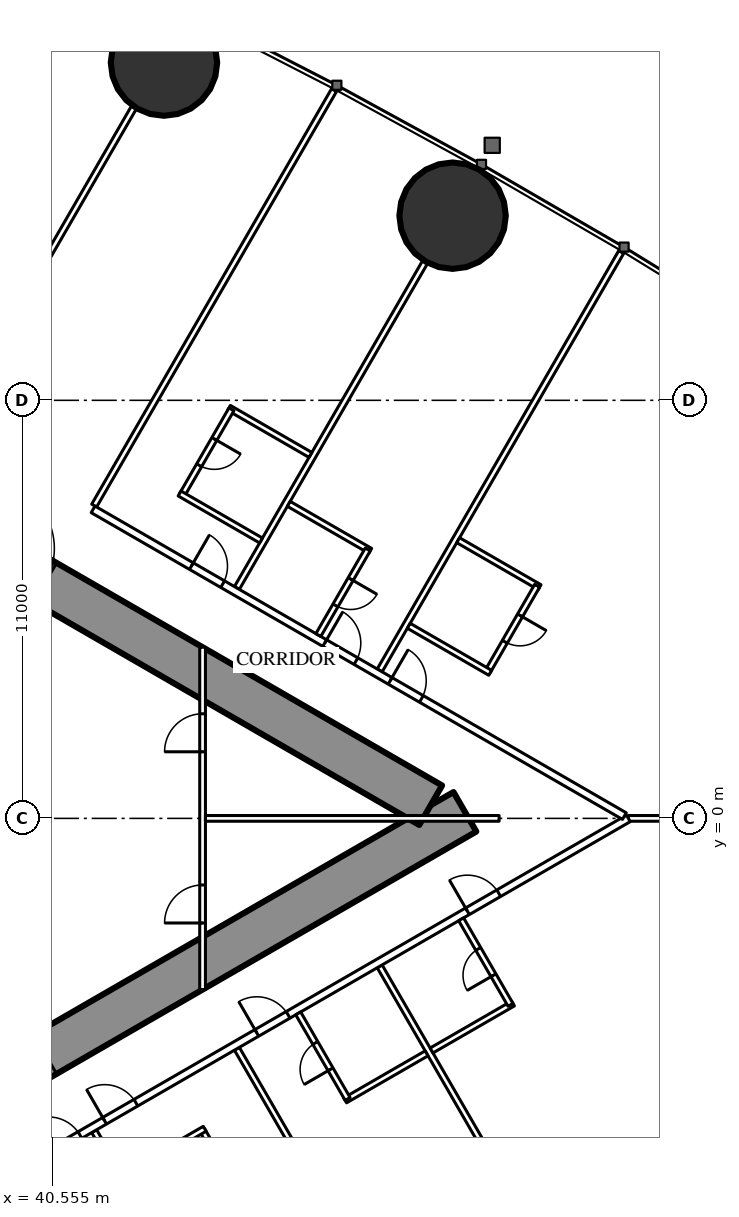
"""IFC4 building model, lengths in metres.
Left out: names, types, materials, properties, quantities, classifications, styles, units other than length and angle.
Written with IfcOpenShell. Run it as: python <this file> out.ifc"""

import sys

from ifc_helpers import new_model, si_unit, direction, frame, frame_2d, origin, origin_2d, place, context, subcontext, project, spatial, rectangle, hollow_circle, extrude, element, fill, save


model = new_model("IFC4")
c1 = context("Model", 3, precision=1e-05, world=origin(), true_north=direction((0.0, 1.0)))
c2 = subcontext(c1, "Body", "Model", "MODEL_VIEW")
j1 = project(units=[si_unit("LENGTHUNIT", "METRE"), si_unit("PLANEANGLEUNIT", "RADIAN")], contexts=[c1])
p1 = place(None, origin())
s1 = spatial("IfcSite", under=j1, at=p1, CompositionType="ELEMENT")
p2 = place(p1, origin())
s2 = spatial("IfcBuilding", under=s1, at=p2, CompositionType="ELEMENT")
p3 = place(p2, frame((0.0, 0.0, 28.5)))
s3 = spatial("IfcBuildingStorey", under=s2, at=p3, CompositionType="ELEMENT", Elevation=28.5)
for number, where, z_axis, x_axis in (
    (1, (51.078, 15.858, 0.0), (0.0, 0.0, 1.0), (1.0, 0.0, 0.0)),
    (2, (43.484, 19.886, 0.0), (0.0, 0.0, 1.0), (1.0, 0.0, 0.0)),
):
    element("IfcColumn", number, at=place(p3, frame(where, z_axis=z_axis, x_axis=x_axis)), inside=s3, PredefinedType="COLUMN", context=c2, shape_type="SweptSolid", body=[
        extrude(hollow_circle(Radius=1.4, WallThickness=0.12, at=origin_2d()), origin(), (0.0, 0.0, 1.0), 3.5),
    ])
p4 = place(p3, frame((27.2, -13.8, 0.0), z_axis=(0.0, 0.0, 1.0), x_axis=(0.866027159892, 0.499996958321, 0.0)))
e3 = element("IfcWall", 3, at=p4, inside=s3, PredefinedType="SHEAR", context=c2, shape_type="SweptSolid", body=[
    extrude(rectangle(XDim=27.947, YDim=1.2, at=frame_2d((13.973, 0.0))), origin(), (0.0, 0.0, 1.0), 3.5),
])
p5 = place(p4, frame((4.6, 0.0, 0.0)))
e4 = element("IfcOpeningElement", 4, at=p5, cuts=e3, PredefinedType="OPENING", context=c2, shape_type="SweptSolid", body=[
    extrude(rectangle(XDim=1.0, YDim=2.2, at=frame_2d((0.5, 1.1))), frame((0.0, 0.61, 0.0), z_axis=(0.0, -1.0, 0.0), x_axis=(1.0, 0.0, 0.0)), (0.0, 0.0, 1.0), 1.22),
])
p6 = place(p4, frame((13.395, 0.0, 0.0)))
e5 = element("IfcOpeningElement", 5, at=p6, cuts=e3, PredefinedType="OPENING", context=c2, shape_type="SweptSolid", body=[
    extrude(rectangle(XDim=1.8, YDim=2.2, at=frame_2d((0.9, 1.1))), frame((0.0, 0.61, 0.0), z_axis=(0.0, -1.0, 0.0), x_axis=(1.0, 0.0, 0.0)), (0.0, 0.0, 1.0), 1.22),
])
p7 = place(p3, frame((27.2, 13.8, 0.0), z_axis=(0.0, 0.0, 1.0), x_axis=(0.866024515034, -0.500001539357, 0.0)))
e6 = element("IfcWall", 6, at=p7, inside=s3, PredefinedType="SHEAR", context=c2, shape_type="SweptSolid", body=[
    extrude(rectangle(XDim=26.907, YDim=1.2, at=frame_2d((13.454, 0.0))), origin(), (0.0, 0.0, 1.0), 3.5),
])
p8 = place(p7, frame((4.6, 0.0, 0.0)))
e7 = element("IfcOpeningElement", 7, at=p8, cuts=e6, PredefinedType="OPENING", context=c2, shape_type="SweptSolid", body=[
    extrude(rectangle(XDim=1.0, YDim=2.2, at=frame_2d((0.5, 1.1))), frame((0.0, 0.61, 0.0), z_axis=(0.0, -1.0, 0.0), x_axis=(1.0, 0.0, 0.0)), (0.0, 0.0, 1.0), 1.22),
])
p9 = place(p7, frame((13.395, 0.0, 0.0)))
e8 = element("IfcOpeningElement", 8, at=p9, cuts=e6, PredefinedType="OPENING", context=c2, shape_type="SweptSolid", body=[
    extrude(rectangle(XDim=1.8, YDim=2.2, at=frame_2d((0.9, 1.1))), frame((0.0, 0.61, 0.0), z_axis=(0.0, -1.0, 0.0), x_axis=(1.0, 0.0, 0.0)), (0.0, 0.0, 1.0), 1.22),
])
p10 = place(p3, frame((41.647, -8.23, 0.0), z_axis=(0.0, 0.0, 1.0), x_axis=(0.49998590462, -0.866033541603, 0.0)))
e9 = element("IfcWall", 9, at=p10, inside=s3, PredefinedType="PARTITIONING", context=c2, shape_type="SweptSolid", body=[
    extrude(rectangle(XDim=12.621, YDim=0.15, at=frame_2d((6.311, 0.0))), origin(), (0.0, 0.0, 1.0), 3.25),
])
p11 = place(p3, frame((45.403, -6.062, 0.0), z_axis=(0.0, 0.0, 1.0), x_axis=(0.500007077968, -0.866021317279, 0.0)))
e10 = element("IfcWall", 10, at=p11, inside=s3, PredefinedType="PARTITIONING", context=c2, shape_type="SweptSolid", body=[
    extrude(rectangle(XDim=12.721, YDim=0.15, at=frame_2d((6.361, 0.0))), origin(), (0.0, 0.0, 1.0), 3.25),
])
p12 = place(p3, frame((49.159, -3.893, 0.0), z_axis=(0.0, 0.0, 1.0), x_axis=(0.499998773722, -0.866026111775, 0.0)))
e11 = element("IfcWall", 11, at=p12, inside=s3, PredefinedType="PARTITIONING", context=c2, shape_type="SweptSolid", body=[
    extrude(rectangle(XDim=9.892, YDim=0.15, at=frame_2d((4.946, 0.0))), origin(), (0.0, 0.0, 1.0), 2.25),
])
p13 = place(p3, frame((37.895, 10.396, 0.0), z_axis=(0.0, 0.0, 1.0), x_axis=(0.499995616528, 0.866027934568, 0.0)))
e12 = element("IfcWall", 12, at=p13, inside=s3, PredefinedType="PARTITIONING", context=c2, shape_type="SweptSolid", body=[
    extrude(rectangle(XDim=9.593, YDim=0.15, at=frame_2d((4.797, 0.0))), origin(), (0.0, 0.0, 1.0), 2.25),
])
p14 = place(p3, frame((41.647, 8.23, 0.0), z_axis=(0.0, 0.0, 1.0), x_axis=(0.49998590462, 0.866033541603, 0.0)))
e13 = element("IfcWall", 13, at=p14, inside=s3, PredefinedType="PARTITIONING", context=c2, shape_type="SweptSolid", body=[
    extrude(rectangle(XDim=12.621, YDim=0.15, at=frame_2d((6.311, 0.0))), origin(), (0.0, 0.0, 1.0), 3.25),
])
p15 = place(p3, frame((45.403, 6.062, 0.0), z_axis=(0.0, 0.0, 1.0), x_axis=(0.500013434677, 0.866017647131, 0.0)))
e14 = element("IfcWall", 14, at=p15, inside=s3, PredefinedType="PARTITIONING", context=c2, shape_type="SweptSolid", body=[
    extrude(rectangle(XDim=9.902, YDim=0.15, at=frame_2d((4.951, 0.0))), origin(), (0.0, 0.0, 1.0), 2.25),
])
p16 = place(p3, frame((49.159, 3.893, 0.0), z_axis=(0.0, 0.0, 1.0), x_axis=(0.499995664361, 0.866027906952, 0.0)))
e15 = element("IfcWall", 15, at=p16, inside=s3, PredefinedType="PARTITIONING", context=c2, shape_type="SweptSolid", body=[
    extrude(rectangle(XDim=12.711, YDim=0.15, at=frame_2d((6.356, 0.0))), origin(), (0.0, 0.0, 1.0), 3.25),
])
p17 = place(p3, frame((55.702, 0.0, 0.0), z_axis=(0.0, 0.0, 1.0), x_axis=(1.0, 0.0, 0.0)))
e16 = element("IfcWall", 16, at=p17, inside=s3, PredefinedType="PARTITIONING", context=c2, shape_type="SweptSolid", body=[
    extrude(rectangle(XDim=16.117, YDim=0.15, at=frame_2d((8.059, 0.0))), origin(), (0.0, 0.0, 1.0), 2.25),
])
p18 = place(p3, frame((37.96, -10.243, 0.0), z_axis=(0.0, 0.0, 1.0), x_axis=(0.866026429433, 0.499998223521, 0.0)))
e17 = element("IfcWall", 17, at=p18, inside=s3, PredefinedType="PARTITIONING", context=c2, shape_type="SweptSolid", body=[
    extrude(rectangle(XDim=20.487, YDim=0.2, at=frame_2d((10.243, 0.0))), origin(), (0.0, 0.0, 1.0), 3.25),
])
p19 = place(p18, frame((4.575, 0.0, 0.0)))
e18 = element("IfcOpeningElement", 18, at=p19, cuts=e17, PredefinedType="OPENING", context=c2, shape_type="SweptSolid", body=[
    extrude(rectangle(XDim=0.95, YDim=2.2, at=frame_2d((0.475, 1.1))), frame((0.0, 0.11, 0.0), z_axis=(0.0, -1.0, 0.0), x_axis=(1.0, 0.0, 0.0)), (0.0, 0.0, 1.0), 0.22),
])
p20 = place(p18, frame((9.199, 0.0, 0.0)))
e19 = element("IfcOpeningElement", 19, at=p20, cuts=e17, PredefinedType="OPENING", context=c2, shape_type="SweptSolid", body=[
    extrude(rectangle(XDim=0.95, YDim=2.2, at=frame_2d((0.475, 1.1))), frame((0.0, 0.11, 0.0), z_axis=(0.0, -1.0, 0.0), x_axis=(1.0, 0.0, 0.0)), (0.0, 0.0, 1.0), 0.22),
])
p21 = place(p18, frame((15.599, 0.0, 0.0)))
e20 = element("IfcOpeningElement", 20, at=p21, cuts=e17, PredefinedType="OPENING", context=c2, shape_type="SweptSolid", body=[
    extrude(rectangle(XDim=0.95, YDim=2.2, at=frame_2d((0.475, 1.1))), frame((0.0, 0.11, 0.0), z_axis=(0.0, -1.0, 0.0), x_axis=(1.0, 0.0, 0.0)), (0.0, 0.0, 1.0), 0.22),
])
p22 = place(p18, frame((2.875, 0.0, 0.0)))
e21 = element("IfcOpeningElement", 21, at=p22, cuts=e17, PredefinedType="OPENING", context=c2, shape_type="SweptSolid", body=[
    extrude(rectangle(XDim=0.95, YDim=2.2, at=frame_2d((0.475, 1.1))), frame((0.0, 0.11, 0.0), z_axis=(0.0, -1.0, 0.0), x_axis=(1.0, 0.0, 0.0)), (0.0, 0.0, 1.0), 0.22),
])
p23 = place(p3, frame((41.619, 8.131, 0.0), z_axis=(0.0, 0.0, 1.0), x_axis=(0.86603245327, -0.499987789734, 0.0)))
e22 = element("IfcWall", 22, at=p23, inside=s3, PredefinedType="PARTITIONING", context=c2, shape_type="SweptSolid", body=[
    extrude(rectangle(XDim=16.142, YDim=0.2, at=frame_2d((8.071, 0.0))), origin(), (0.0, 0.0, 1.0), 3.25),
])
p24 = place(p23, frame((9.024, 0.0, 0.0)))
e23 = element("IfcOpeningElement", 23, at=p24, cuts=e22, PredefinedType="OPENING", context=c2, shape_type="SweptSolid", body=[
    extrude(rectangle(XDim=0.95, YDim=2.2, at=frame_2d((0.475, 1.1))), frame((0.0, 0.11, 0.0), z_axis=(0.0, -1.0, 0.0), x_axis=(1.0, 0.0, 0.0)), (0.0, 0.0, 1.0), 0.22),
])
p25 = place(p23, frame((7.037, 0.0, 0.0)))
e24 = element("IfcOpeningElement", 24, at=p25, cuts=e22, PredefinedType="OPENING", context=c2, shape_type="SweptSolid", body=[
    extrude(rectangle(XDim=0.95, YDim=2.2, at=frame_2d((0.475, 1.1))), frame((0.0, 0.11, 0.0), z_axis=(0.0, -1.0, 0.0), x_axis=(1.0, 0.0, 0.0)), (0.0, 0.0, 1.0), 0.22),
])
p26 = place(p23, frame((2.987, 0.0, 0.0)))
e25 = element("IfcOpeningElement", 25, at=p26, cuts=e22, PredefinedType="OPENING", context=c2, shape_type="SweptSolid", body=[
    extrude(rectangle(XDim=0.95, YDim=2.2, at=frame_2d((0.475, 1.1))), frame((0.0, 0.11, 0.0), z_axis=(0.0, -1.0, 0.0), x_axis=(1.0, 0.0, 0.0)), (0.0, 0.0, 1.0), 0.22),
])
p27 = place(p3, frame((44.491, -8.205, 0.0), z_axis=(0.0, 0.0, 1.0), x_axis=(0.500047596559, -0.865997922154, 0.0)))
e26 = element("IfcWall", 26, at=p27, inside=s3, PredefinedType="PARTITIONING", context=c2, shape_type="SweptSolid", body=[
    extrude(rectangle(XDim=2.6, YDim=0.15, at=frame_2d((1.3, 0.0))), origin(), (0.0, 0.0, 1.0), 3.25),
])
p28 = place(p27, frame((0.9, 0.0, 0.0)))
e27 = element("IfcOpeningElement", 27, at=p28, cuts=e26, PredefinedType="OPENING", context=c2, shape_type="SweptSolid", body=[
    extrude(rectangle(XDim=0.8, YDim=2.2, at=frame_2d((0.4, 1.1))), frame((0.0, 0.085, 0.0), z_axis=(0.0, -1.0, 0.0), x_axis=(1.0, 0.0, 0.0)), (0.0, 0.0, 1.0), 0.17),
])
for number, where, z_axis, x_axis in (
    (28, (42.412, -9.405, 0.0), (0.0, 0.0, 1.0), (0.866, 0.5, 0.0)),
    (29, (48.251, -7.42, 0.0), (0.0, 0.0, 1.0), (0.866, 0.5, 0.0)),
):
    element("IfcWall", number, at=place(p3, frame(where, z_axis=z_axis, x_axis=x_axis)), inside=s3, PredefinedType="PARTITIONING", context=c2, shape_type="SweptSolid", body=[
        extrude(rectangle(XDim=2.475, YDim=0.15, at=frame_2d((1.237, 0.0))), origin(), (0.0, 0.0, 1.0), 3.25),
    ])
p29 = place(p3, frame((47.016, -5.13, 0.0), z_axis=(0.0, 0.0, 1.0), x_axis=(0.500006934395, -0.866021400173, 0.0)))
e30 = element("IfcWall", 30, at=p29, inside=s3, PredefinedType="PARTITIONING", context=c2, shape_type="SweptSolid", body=[
    extrude(rectangle(XDim=2.6, YDim=0.15, at=frame_2d((1.3, 0.0))), origin(), (0.0, 0.0, 1.0), 3.25),
])
p30 = place(p29, frame((0.9, 0.0, 0.0)))
e31 = element("IfcOpeningElement", 31, at=p30, cuts=e30, PredefinedType="OPENING", context=c2, shape_type="SweptSolid", body=[
    extrude(rectangle(XDim=0.8, YDim=2.2, at=frame_2d((0.4, 1.1))), frame((0.0, 0.085, 0.0), z_axis=(0.0, -1.0, 0.0), x_axis=(1.0, 0.0, 0.0)), (0.0, 0.0, 1.0), 0.17),
])
p31 = place(p3, frame((50.524, -6.107, 0.0), z_axis=(0.0, 0.0, 1.0), x_axis=(0.866031185235, 0.4999899861, 0.0)))
e32 = element("IfcWall", 32, at=p31, inside=s3, PredefinedType="PARTITIONING", context=c2, shape_type="SweptSolid", body=[
    extrude(rectangle(XDim=2.475, YDim=0.15, at=frame_2d((1.238, 0.0))), origin(), (0.0, 0.0, 1.0), 3.25),
])
p32 = place(p3, frame((51.303, -2.656, 0.0), z_axis=(0.0, 0.0, 1.0), x_axis=(0.500047596559, -0.865997922154, 0.0)))
e33 = element("IfcWall", 33, at=p32, inside=s3, PredefinedType="PARTITIONING", context=c2, shape_type="SweptSolid", body=[
    extrude(rectangle(XDim=2.6, YDim=0.15, at=frame_2d((1.3, 0.0))), origin(), (0.0, 0.0, 1.0), 3.25),
])
p33 = place(p32, frame((0.9, 0.0, 0.0)))
e34 = element("IfcOpeningElement", 34, at=p33, cuts=e33, PredefinedType="OPENING", context=c2, shape_type="SweptSolid", body=[
    extrude(rectangle(XDim=0.8, YDim=2.2, at=frame_2d((0.4, 1.1))), frame((0.0, 0.085, 0.0), z_axis=(0.0, -1.0, 0.0), x_axis=(1.0, 0.0, 0.0)), (0.0, 0.0, 1.0), 0.17),
])
p34 = place(p3, frame((51.224, 7.32, 0.0), z_axis=(0.0, 0.0, 1.0), x_axis=(0.866031185235, -0.4999899861, 0.0)))
e35 = element("IfcWall", 35, at=p34, inside=s3, PredefinedType="PARTITIONING", context=c2, shape_type="SweptSolid", body=[
    extrude(rectangle(XDim=2.475, YDim=0.15, at=frame_2d((1.238, 0.0))), origin(), (0.0, 0.0, 1.0), 3.25),
])
p35 = place(p3, frame((52.003, 3.868, 0.0), z_axis=(0.0, 0.0, 1.0), x_axis=(0.500047596559, 0.865997922154, 0.0)))
e36 = element("IfcWall", 36, at=p35, inside=s3, PredefinedType="PARTITIONING", context=c2, shape_type="SweptSolid", body=[
    extrude(rectangle(XDim=2.6, YDim=0.15, at=frame_2d((1.3, 0.0))), origin(), (0.0, 0.0, 1.0), 3.25),
])
p36 = place(p35, frame((0.9, 0.0, 0.0)))
e37 = element("IfcOpeningElement", 37, at=p36, cuts=e36, PredefinedType="OPENING", context=c2, shape_type="SweptSolid", body=[
    extrude(rectangle(XDim=0.8, YDim=2.2, at=frame_2d((0.4, 1.1))), frame((0.0, 0.085, 0.0), z_axis=(0.0, -1.0, 0.0), x_axis=(1.0, 0.0, 0.0)), (0.0, 0.0, 1.0), 0.17),
])
p37 = place(p3, frame((49.925, 5.068, 0.0), z_axis=(0.0, 0.0, 1.0), x_axis=(0.866006523861, -0.500032699561, 0.0)))
e38 = element("IfcWall", 38, at=p37, inside=s3, PredefinedType="PARTITIONING", context=c2, shape_type="SweptSolid", body=[
    extrude(rectangle(XDim=2.475, YDim=0.15, at=frame_2d((1.237, 0.0))), origin(), (0.0, 0.0, 1.0), 3.25),
])
p38 = place(p3, frame((46.768, 8.276, 0.0), z_axis=(0.0, 0.0, 1.0), x_axis=(0.866031185235, -0.4999899861, 0.0)))
e39 = element("IfcWall", 39, at=p38, inside=s3, PredefinedType="PARTITIONING", context=c2, shape_type="SweptSolid", body=[
    extrude(rectangle(XDim=2.475, YDim=0.15, at=frame_2d((1.238, 0.0))), origin(), (0.0, 0.0, 1.0), 3.25),
])
p39 = place(p3, frame((47.546, 4.824, 0.0), z_axis=(0.0, 0.0, 1.0), x_axis=(0.500006934395, 0.866021400173, 0.0)))
e40 = element("IfcWall", 40, at=p39, inside=s3, PredefinedType="PARTITIONING", context=c2, shape_type="SweptSolid", body=[
    extrude(rectangle(XDim=2.6, YDim=0.15, at=frame_2d((1.3, 0.0))), origin(), (0.0, 0.0, 1.0), 3.25),
])
p40 = place(p39, frame((0.9, 0.0, 0.0)))
e41 = element("IfcOpeningElement", 41, at=p40, cuts=e40, PredefinedType="OPENING", context=c2, shape_type="SweptSolid", body=[
    extrude(rectangle(XDim=0.8, YDim=2.2, at=frame_2d((0.4, 1.1))), frame((0.0, 0.085, 0.0), z_axis=(0.0, -1.0, 0.0), x_axis=(1.0, 0.0, 0.0)), (0.0, 0.0, 1.0), 0.17),
])
p41 = place(p3, frame((45.195, 10.801, 0.0), z_axis=(0.0, 0.0, 1.0), x_axis=(0.86604923931, -0.499958713387, 0.0)))
e42 = element("IfcWall", 42, at=p41, inside=s3, PredefinedType="PARTITIONING", context=c2, shape_type="SweptSolid", body=[
    extrude(rectangle(XDim=2.475, YDim=0.15, at=frame_2d((1.237, 0.0))), origin(), (0.0, 0.0, 1.0), 3.25),
])
p42 = place(p3, frame((43.959, 8.512, 0.0), z_axis=(0.0, 0.0, 1.0), x_axis=(0.500006934395, 0.866021400173, 0.0)))
e43 = element("IfcWall", 43, at=p42, inside=s3, PredefinedType="PARTITIONING", context=c2, shape_type="SweptSolid", body=[
    extrude(rectangle(XDim=2.6, YDim=0.15, at=frame_2d((1.3, 0.0))), origin(), (0.0, 0.0, 1.0), 3.25),
])
p43 = place(p42, frame((0.9, 0.0, 0.0)))
e44 = element("IfcOpeningElement", 44, at=p43, cuts=e43, PredefinedType="OPENING", context=c2, shape_type="SweptSolid", body=[
    extrude(rectangle(XDim=0.8, YDim=2.2, at=frame_2d((0.4, 1.1))), frame((0.0, 0.085, 0.0), z_axis=(0.0, -1.0, 0.0), x_axis=(1.0, 0.0, 0.0)), (0.0, 0.0, 1.0), 0.17),
])
p44 = place(p3, frame((43.895, 8.549, 0.0), z_axis=(0.0, 0.0, 1.0), x_axis=(0.866031185235, -0.4999899861, 0.0)))
e45 = element("IfcWall", 45, at=p44, inside=s3, PredefinedType="PARTITIONING", context=c2, shape_type="SweptSolid", body=[
    extrude(rectangle(XDim=2.475, YDim=0.15, at=frame_2d((1.238, 0.0))), origin(), (0.0, 0.0, 1.0), 3.25),
])
p45 = place(p3, frame((44.5, -4.505, 0.0), z_axis=(0.0, 0.0, 1.0), x_axis=(0.0, 1.0, 0.0)))
e46 = element("IfcWall", 46, at=p45, inside=s3, PredefinedType="PARTITIONING", context=c2, shape_type="SweptSolid", body=[
    extrude(rectangle(XDim=9.009, YDim=0.15, at=frame_2d((4.505, 0.0))), origin(), (0.0, 0.0, 1.0), 2.45),
])
p46 = place(p45, frame((1.752, 0.0, 0.0)))
e47 = element("IfcOpeningElement", 47, at=p46, cuts=e46, PredefinedType="OPENING", context=c2, shape_type="SweptSolid", body=[
    extrude(rectangle(XDim=1.0, YDim=2.2, at=frame_2d((0.5, 1.1))), frame((0.0, 0.085, 0.0), z_axis=(0.0, -1.0, 0.0), x_axis=(1.0, 0.0, 0.0)), (0.0, 0.0, 1.0), 0.17),
])
p47 = place(p45, frame((6.257, 0.0, 0.0)))
e48 = element("IfcOpeningElement", 48, at=p47, cuts=e46, PredefinedType="OPENING", context=c2, shape_type="SweptSolid", body=[
    extrude(rectangle(XDim=1.0, YDim=2.2, at=frame_2d((0.5, 1.1))), frame((0.0, 0.085, 0.0), z_axis=(0.0, -1.0, 0.0), x_axis=(1.0, 0.0, 0.0)), (0.0, 0.0, 1.0), 0.17),
])
p48 = place(p3, frame((44.575, 0.0, 0.0), z_axis=(0.0, 0.0, 1.0), x_axis=(1.0, 0.0, 0.0)))
e49 = element("IfcWall", 49, at=p48, inside=s3, PredefinedType="PARTITIONING", context=c2, shape_type="SweptSolid", body=[
    extrude(rectangle(XDim=7.727, YDim=0.15, at=frame_2d((3.864, 0.0))), origin(), (0.0, 0.0, 1.0), 2.25),
])
p49 = place(p19, origin())
e50 = element("IfcDoor", 50, at=p49, inside=s3, OperationType="SINGLE_SWING_LEFT", PredefinedType="DOOR", context=c2, shape_type="SweptSolid", body=[
    extrude(rectangle(XDim=0.95, YDim=2.2, at=frame_2d((0.475, 1.1))), frame((0.0, 0.025, 0.0), z_axis=(0.0, -1.0, 0.0), x_axis=(1.0, 0.0, 0.0)), (0.0, 0.0, 1.0), 0.05),
])
fill(e18, e50)
p50 = place(p30, origin())
e51 = element("IfcDoor", 51, at=p50, inside=s3, OperationType="SINGLE_SWING_RIGHT", PredefinedType="DOOR", context=c2, shape_type="SweptSolid", body=[
    extrude(rectangle(XDim=0.8, YDim=2.2, at=frame_2d((0.4, 1.1))), frame((0.0, 0.025, 0.0), z_axis=(0.0, -1.0, 0.0), x_axis=(1.0, 0.0, 0.0)), (0.0, 0.0, 1.0), 0.05),
])
fill(e31, e51)
p51 = place(p20, origin())
e52 = element("IfcDoor", 52, at=p51, inside=s3, OperationType="SINGLE_SWING_LEFT", PredefinedType="DOOR", context=c2, shape_type="SweptSolid", body=[
    extrude(rectangle(XDim=0.95, YDim=2.2, at=frame_2d((0.475, 1.1))), frame((0.0, 0.025, 0.0), z_axis=(0.0, -1.0, 0.0), x_axis=(1.0, 0.0, 0.0)), (0.0, 0.0, 1.0), 0.05),
])
fill(e19, e52)
p52 = place(p33, origin())
e53 = element("IfcDoor", 53, at=p52, inside=s3, OperationType="SINGLE_SWING_RIGHT", PredefinedType="DOOR", context=c2, shape_type="SweptSolid", body=[
    extrude(rectangle(XDim=0.8, YDim=2.2, at=frame_2d((0.4, 1.1))), frame((0.0, 0.025, 0.0), z_axis=(0.0, -1.0, 0.0), x_axis=(1.0, 0.0, 0.0)), (0.0, 0.0, 1.0), 0.05),
])
fill(e34, e53)
p53 = place(p21, origin())
e54 = element("IfcDoor", 54, at=p53, inside=s3, OperationType="SINGLE_SWING_LEFT", PredefinedType="DOOR", context=c2, shape_type="SweptSolid", body=[
    extrude(rectangle(XDim=0.95, YDim=2.2, at=frame_2d((0.475, 1.1))), frame((0.0, 0.025, 0.0), z_axis=(0.0, -1.0, 0.0), x_axis=(1.0, 0.0, 0.0)), (0.0, 0.0, 1.0), 0.05),
])
fill(e20, e54)
p54 = place(p36, origin())
e55 = element("IfcDoor", 55, at=p54, inside=s3, OperationType="SINGLE_SWING_RIGHT", PredefinedType="DOOR", context=c2, shape_type="SweptSolid", body=[
    extrude(rectangle(XDim=0.8, YDim=2.2, at=frame_2d((0.4, 1.1))), frame((0.0, 0.025, 0.0), z_axis=(0.0, -1.0, 0.0), x_axis=(1.0, 0.0, 0.0)), (0.0, 0.0, 1.0), 0.05),
])
fill(e37, e55)
p55 = place(p24, origin())
e56 = element("IfcDoor", 56, at=p55, inside=s3, OperationType="SINGLE_SWING_LEFT", PredefinedType="DOOR", context=c2, shape_type="SweptSolid", body=[
    extrude(rectangle(XDim=0.95, YDim=2.2, at=frame_2d((0.475, 1.1))), frame((0.0, 0.025, 0.0), z_axis=(0.0, -1.0, 0.0), x_axis=(1.0, 0.0, 0.0)), (0.0, 0.0, 1.0), 0.05),
])
fill(e23, e56)
p56 = place(p40, origin())
e57 = element("IfcDoor", 57, at=p56, inside=s3, OperationType="SINGLE_SWING_RIGHT", PredefinedType="DOOR", context=c2, shape_type="SweptSolid", body=[
    extrude(rectangle(XDim=0.8, YDim=2.2, at=frame_2d((0.4, 1.1))), frame((0.0, 0.025, 0.0), z_axis=(0.0, -1.0, 0.0), x_axis=(1.0, 0.0, 0.0)), (0.0, 0.0, 1.0), 0.05),
])
fill(e41, e57)
p57 = place(p25, origin())
e58 = element("IfcDoor", 58, at=p57, inside=s3, OperationType="SINGLE_SWING_LEFT", PredefinedType="DOOR", context=c2, shape_type="SweptSolid", body=[
    extrude(rectangle(XDim=0.95, YDim=2.2, at=frame_2d((0.475, 1.1))), frame((0.0, 0.025, 0.0), z_axis=(0.0, -1.0, 0.0), x_axis=(1.0, 0.0, 0.0)), (0.0, 0.0, 1.0), 0.05),
])
fill(e24, e58)
p58 = place(p43, origin())
e59 = element("IfcDoor", 59, at=p58, inside=s3, OperationType="SINGLE_SWING_RIGHT", PredefinedType="DOOR", context=c2, shape_type="SweptSolid", body=[
    extrude(rectangle(XDim=0.8, YDim=2.2, at=frame_2d((0.4, 1.1))), frame((0.0, 0.025, 0.0), z_axis=(0.0, -1.0, 0.0), x_axis=(1.0, 0.0, 0.0)), (0.0, 0.0, 1.0), 0.05),
])
fill(e44, e59)
p59 = place(p26, origin())
e60 = element("IfcDoor", 60, at=p59, inside=s3, OperationType="SINGLE_SWING_LEFT", PredefinedType="DOOR", context=c2, shape_type="SweptSolid", body=[
    extrude(rectangle(XDim=0.95, YDim=2.2, at=frame_2d((0.475, 1.1))), frame((0.0, 0.025, 0.0), z_axis=(0.0, -1.0, 0.0), x_axis=(1.0, 0.0, 0.0)), (0.0, 0.0, 1.0), 0.05),
])
fill(e25, e60)
p60 = place(p22, origin())
e61 = element("IfcDoor", 61, at=p60, inside=s3, OperationType="SINGLE_SWING_LEFT", PredefinedType="DOOR", context=c2, shape_type="SweptSolid", body=[
    extrude(rectangle(XDim=0.95, YDim=2.2, at=frame_2d((0.475, 1.1))), frame((0.0, 0.025, 0.0), z_axis=(0.0, -1.0, 0.0), x_axis=(1.0, 0.0, 0.0)), (0.0, 0.0, 1.0), 0.05),
])
fill(e21, e61)
p61 = place(p46, origin())
e62 = element("IfcDoor", 62, at=p61, inside=s3, OperationType="SINGLE_SWING_LEFT", PredefinedType="DOOR", context=c2, shape_type="SweptSolid", body=[
    extrude(rectangle(XDim=1.0, YDim=2.2, at=frame_2d((0.5, 1.1))), frame((0.0, 0.025, 0.0), z_axis=(0.0, -1.0, 0.0), x_axis=(1.0, 0.0, 0.0)), (0.0, 0.0, 1.0), 0.05),
])
fill(e47, e62)
p62 = place(p47, origin())
e63 = element("IfcDoor", 63, at=p62, inside=s3, OperationType="SINGLE_SWING_LEFT", PredefinedType="DOOR", context=c2, shape_type="SweptSolid", body=[
    extrude(rectangle(XDim=1.0, YDim=2.2, at=frame_2d((0.5, 1.1))), frame((0.0, 0.025, 0.0), z_axis=(0.0, -1.0, 0.0), x_axis=(1.0, 0.0, 0.0)), (0.0, 0.0, 1.0), 0.05),
])
fill(e48, e63)
save(model, sys.argv[1])
